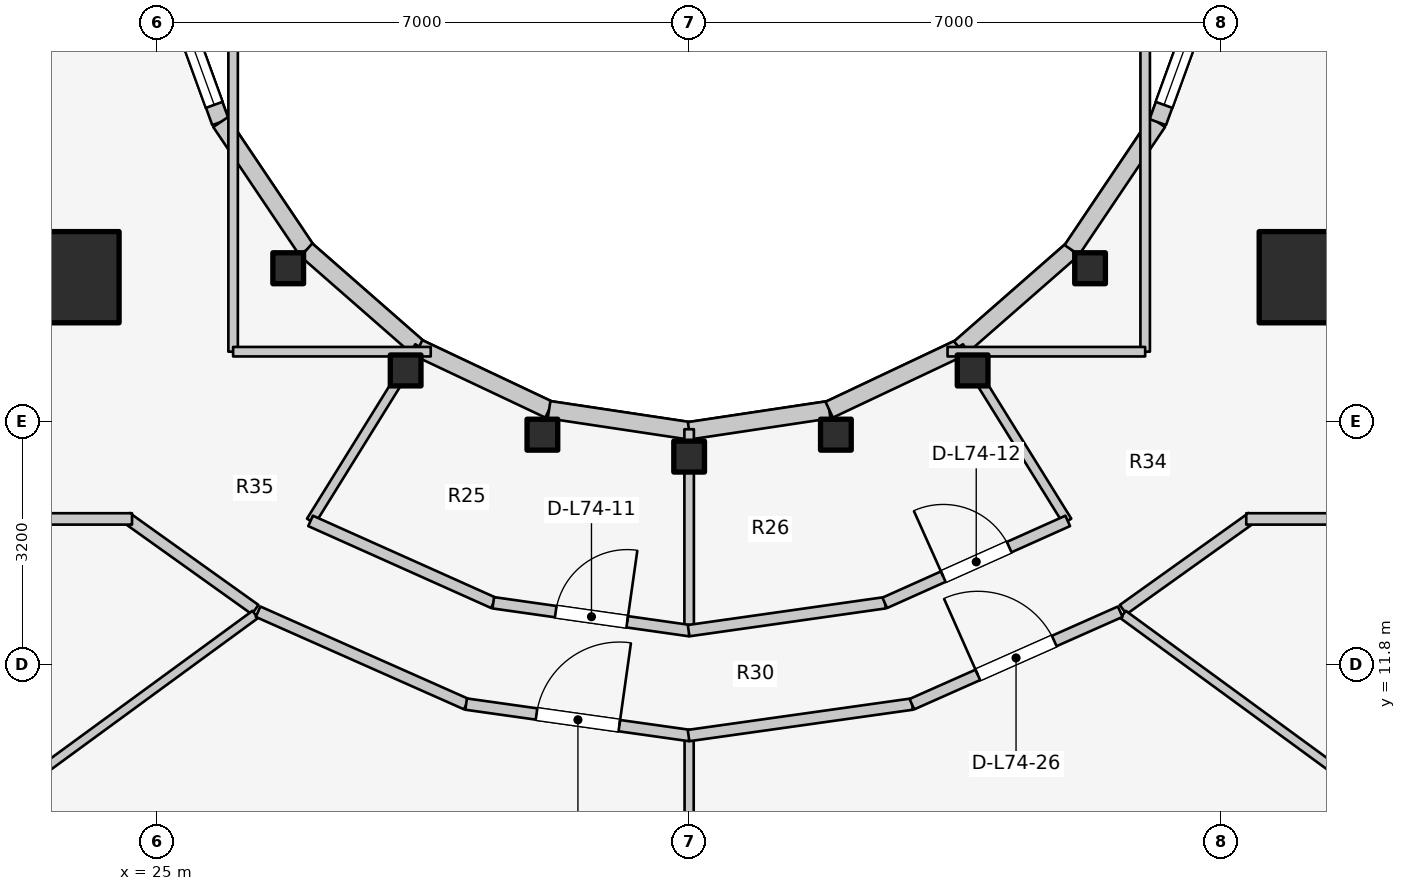
"""IFC4 building model, lengths in metres.
Left out: names, types, materials, properties, quantities, classifications, styles, units other than length and angle.
Written with IfcOpenShell. Run it as: python <this file> out.ifc"""

import sys

from ifc_helpers import new_model, si_unit, direction, frame, frame_2d, origin, origin_2d, place, context, subcontext, project, spatial, rectangle, i_section, extrude, element, fill, save


model = new_model("IFC4")
c1 = context("Model", 3, precision=1e-05, world=origin(), true_north=direction((0.0, 1.0)))
c2 = subcontext(c1, "Body", "Model", "MODEL_VIEW")
j1 = project(units=[si_unit("LENGTHUNIT", "METRE"), si_unit("PLANEANGLEUNIT", "RADIAN")], contexts=[c1])
p1 = place(None, origin())
s1 = spatial("IfcSite", under=j1, at=p1, CompositionType="ELEMENT")
p2 = place(p1, origin())
s2 = spatial("IfcBuilding", under=s1, at=p2, CompositionType="ELEMENT")
p3 = place(p2, frame((0.0, 0.0, 242.4)))
s3 = spatial("IfcBuildingStorey", under=s2, at=p3, CompositionType="ELEMENT", Elevation=242.4)
for number, where, z_axis, x_axis in (
    (1, (19.65, 16.55, 0.0), (0.0, 0.0, 1.0), (1.0, 0.0, 0.0)),
    (2, (39.85, 16.55, 0.0), (0.0, 0.0, 1.0), (1.0, 0.0, 0.0)),
):
    element("IfcWall", number, at=place(p3, frame(where, z_axis=z_axis, x_axis=x_axis)), inside=s3, PredefinedType="SHEAR", context=c2, shape_type="SweptSolid", body=[
        extrude(rectangle(XDim=4.5, YDim=0.45, at=frame_2d((2.25, 0.0))), origin(), (0.0, 0.0, 1.0), 3.6),
    ])
for number, where, z_axis, x_axis in (
    (3, (23.9, 16.9, 0.0), (0.0, 0.0, 1.0), (1.0, 0.0, 0.0)),
    (4, (40.1, 16.9, 0.0), (0.0, 0.0, 1.0), (1.0, 0.0, 0.0)),
):
    element("IfcColumn", number, at=place(p3, frame(where, z_axis=z_axis, x_axis=x_axis)), inside=s3, PredefinedType="COLUMN", context=c2, shape_type="SweptSolid", body=[
        extrude(rectangle(XDim=1.2, YDim=1.2, at=origin_2d()), origin(), (0.0, 0.0, 1.0), 3.6),
    ])
for number, where, z_axis, x_axis in (
    (5, (26.725, 17.018, 0.0), (0.0, 0.0, 1.0), (1.0, 0.0, 0.0)),
    (6, (28.27, 15.673, 0.0), (0.0, 0.0, 1.0), (1.0, 0.0, 0.0)),
    (7, (30.069, 14.828, 0.0), (0.0, 0.0, 1.0), (1.0, 0.0, 0.0)),
    (8, (32.0, 14.54, 0.0), (0.0, 0.0, 1.0), (1.0, 0.0, 0.0)),
    (9, (33.931, 14.828, 0.0), (0.0, 0.0, 1.0), (1.0, 0.0, 0.0)),
    (10, (35.73, 15.673, 0.0), (0.0, 0.0, 1.0), (1.0, 0.0, 0.0)),
    (11, (37.275, 17.018, 0.0), (0.0, 0.0, 1.0), (1.0, 0.0, 0.0)),
):
    element("IfcColumn", number, at=place(p3, frame(where, z_axis=z_axis, x_axis=x_axis)), inside=s3, PredefinedType="COLUMN", context=c2, shape_type="SweptSolid", body=[
        extrude(i_section(OverallWidth=0.404, OverallDepth=0.407, WebThickness=0.027, FlangeThickness=0.044, FilletRadius=0.025, at=origin_2d()), origin(), (0.0, 0.0, 1.0), 3.6),
    ])
p4 = place(p3, frame((25.123, 20.898, 0.0), z_axis=(0.0, 0.0, 1.0), x_axis=(0.341423187295, -0.93990968033, 0.0)))
e12 = element("IfcWall", 12, at=p4, inside=s3, PredefinedType="STANDARD", context=c2, shape_type="SweptSolid", body=[
    extrude(rectangle(XDim=2.084, YDim=0.23, at=frame_2d((1.042, 0.0))), origin(), (0.0, 0.0, 1.0), 3.28),
])
p5 = place(p4, frame((0.242, 0.0, 0.85)))
e13 = element("IfcOpeningElement", 13, at=p5, cuts=e12, PredefinedType="OPENING", context=c2, shape_type="SweptSolid", body=[
    extrude(rectangle(XDim=1.6, YDim=1.65, at=frame_2d((0.8, 0.825))), frame((0.0, 0.125, 0.0), z_axis=(0.0, -1.0, 0.0), x_axis=(1.0, 0.0, 0.0)), (0.0, 0.0, 1.0), 0.25),
])
p6 = place(p3, frame((25.834, 18.94, 0.0), z_axis=(0.0, 0.0, 1.0), x_axis=(0.558197800898, -0.829707909492, 0.0)))
e14 = element("IfcWall", 14, at=p6, inside=s3, PredefinedType="STANDARD", context=c2, shape_type="SweptSolid", body=[
    extrude(rectangle(XDim=2.027, YDim=0.23, at=frame_2d((1.013, 0.0))), origin(), (0.0, 0.0, 1.0), 2.6),
])
p7 = place(p3, frame((26.965, 17.258, 0.0), z_axis=(0.0, 0.0, 1.0), x_axis=(0.752576694707, -0.658504607869, 0.0)))
e15 = element("IfcWall", 15, at=p7, inside=s3, PredefinedType="STANDARD", context=c2, shape_type="SweptSolid", body=[
    extrude(rectangle(XDim=1.959, YDim=0.23, at=frame_2d((0.98, 0.0))), origin(), (0.0, 0.0, 1.0), 2.6),
])
p8 = place(p3, frame((28.44, 15.968, 0.0), z_axis=(0.0, 0.0, 1.0), x_axis=(0.904179699603, -0.427152280606, 0.0)))
e16 = element("IfcWall", 16, at=p8, inside=s3, PredefinedType="STANDARD", context=c2, shape_type="SweptSolid", body=[
    extrude(rectangle(XDim=1.899, YDim=0.23, at=frame_2d((0.95, 0.0))), origin(), (0.0, 0.0, 1.0), 2.6),
])
for number, where, z_axis, x_axis in (
    (17, (30.157, 15.157, 0.0), (0.0, 0.0, 1.0), (0.989, -0.149, 0.0)),
    (18, (32.0, 14.88, 0.0), (0.0, 0.0, 1.0), (0.989, 0.149, 0.0)),
):
    element("IfcWall", number, at=place(p3, frame(where, z_axis=z_axis, x_axis=x_axis)), inside=s3, PredefinedType="STANDARD", context=c2, shape_type="SweptSolid", body=[
        extrude(rectangle(XDim=1.864, YDim=0.23, at=frame_2d((0.932, 0.0))), origin(), (0.0, 0.0, 1.0), 2.6),
    ])
p9 = place(p3, frame((33.843, 15.157, 0.0), z_axis=(0.0, 0.0, 1.0), x_axis=(0.904179699603, 0.427152280606, 0.0)))
e19 = element("IfcWall", 19, at=p9, inside=s3, PredefinedType="STANDARD", context=c2, shape_type="SweptSolid", body=[
    extrude(rectangle(XDim=1.899, YDim=0.23, at=frame_2d((0.95, 0.0))), origin(), (0.0, 0.0, 1.0), 2.6),
])
p10 = place(p3, frame((35.56, 15.968, 0.0), z_axis=(0.0, 0.0, 1.0), x_axis=(0.752576694707, 0.658504607869, 0.0)))
e20 = element("IfcWall", 20, at=p10, inside=s3, PredefinedType="STANDARD", context=c2, shape_type="SweptSolid", body=[
    extrude(rectangle(XDim=1.959, YDim=0.23, at=frame_2d((0.98, 0.0))), origin(), (0.0, 0.0, 1.0), 2.6),
])
p11 = place(p3, frame((37.035, 17.258, 0.0), z_axis=(0.0, 0.0, 1.0), x_axis=(0.558197800898, 0.829707909492, 0.0)))
e21 = element("IfcWall", 21, at=p11, inside=s3, PredefinedType="STANDARD", context=c2, shape_type="SweptSolid", body=[
    extrude(rectangle(XDim=2.027, YDim=0.23, at=frame_2d((1.013, 0.0))), origin(), (0.0, 0.0, 1.0), 2.6),
])
p12 = place(p3, frame((38.166, 18.94, 0.0), z_axis=(0.0, 0.0, 1.0), x_axis=(0.341423187295, 0.93990968033, 0.0)))
e22 = element("IfcWall", 22, at=p12, inside=s3, PredefinedType="STANDARD", context=c2, shape_type="SweptSolid", body=[
    extrude(rectangle(XDim=2.084, YDim=0.23, at=frame_2d((1.042, 0.0))), origin(), (0.0, 0.0, 1.0), 3.28),
])
p13 = place(p12, frame((0.242, 0.0, 0.85)))
e23 = element("IfcOpeningElement", 23, at=p13, cuts=e22, PredefinedType="OPENING", context=c2, shape_type="SweptSolid", body=[
    extrude(rectangle(XDim=1.6, YDim=1.65, at=frame_2d((0.8, 0.825))), frame((0.0, 0.125, 0.0), z_axis=(0.0, -1.0, 0.0), x_axis=(1.0, 0.0, 0.0)), (0.0, 0.0, 1.0), 0.25),
])
p14 = place(p3, frame((28.45, 15.985, 0.0), z_axis=(0.0, 0.0, 1.0), x_axis=(-0.527527080983, -0.849538215049, 0.0)))
e24 = element("IfcWall", 24, at=p14, inside=s3, PredefinedType="PARTITIONING", context=c2, shape_type="SweptSolid", body=[
    extrude(rectangle(XDim=2.701, YDim=0.125, at=frame_2d((1.351, 0.0))), origin(), (0.0, 0.0, 1.0), 2.672),
])
p15 = place(p3, frame((32.0, 14.9, 0.0), z_axis=(0.0, 0.0, 1.0), x_axis=(0.0, -1.0, 0.0)))
e25 = element("IfcWall", 25, at=p15, inside=s3, PredefinedType="PARTITIONING", context=c2, shape_type="SweptSolid", body=[
    extrude(rectangle(XDim=2.65, YDim=0.125, at=frame_2d((1.325, 0.0))), origin(), (0.0, 0.0, 1.0), 2.672),
])
p16 = place(p3, frame((35.55, 15.985, 0.0), z_axis=(0.0, 0.0, 1.0), x_axis=(0.527527080983, -0.849538215049, 0.0)))
e26 = element("IfcWall", 26, at=p16, inside=s3, PredefinedType="PARTITIONING", context=c2, shape_type="SweptSolid", body=[
    extrude(rectangle(XDim=2.701, YDim=0.125, at=frame_2d((1.351, 0.0))), origin(), (0.0, 0.0, 1.0), 2.672),
])
p17 = place(p3, frame((27.019, 13.694, 0.0), z_axis=(0.0, 0.0, 1.0), x_axis=(0.912628408652, -0.408790151203, 0.0)))
e27 = element("IfcWall", 27, at=p17, inside=s3, PredefinedType="PARTITIONING", context=c2, shape_type="SweptSolid", body=[
    extrude(rectangle(XDim=2.638, YDim=0.15, at=frame_2d((1.319, 0.0))), origin(), (0.0, 0.0, 1.0), 2.816),
])
p18 = place(p3, frame((29.423, 12.617, 0.0), z_axis=(0.0, 0.0, 1.0), x_axis=(0.990078185178, -0.140517569133, 0.0)))
e28 = element("IfcWall", 28, at=p18, inside=s3, PredefinedType="PARTITIONING", context=c2, shape_type="SweptSolid", body=[
    extrude(rectangle(XDim=2.61, YDim=0.15, at=frame_2d((1.305, 0.0))), origin(), (0.0, 0.0, 1.0), 2.816),
])
p19 = place(p18, frame((0.83, 0.0, 0.0)))
e29 = element("IfcOpeningElement", 29, at=p19, cuts=e28, PredefinedType="OPENING", context=c2, shape_type="SweptSolid", body=[
    extrude(rectangle(XDim=0.95, YDim=2.1, at=frame_2d((0.475, 1.05))), frame((0.0, 0.085, 0.0), z_axis=(0.0, -1.0, 0.0), x_axis=(1.0, 0.0, 0.0)), (0.0, 0.0, 1.0), 0.17),
])
p20 = place(p3, frame((31.993, 12.25, 0.0), z_axis=(0.0, 0.0, 1.0), x_axis=(0.990078185178, 0.140517569133, 0.0)))
e30 = element("IfcWall", 30, at=p20, inside=s3, PredefinedType="PARTITIONING", context=c2, shape_type="SweptSolid", body=[
    extrude(rectangle(XDim=2.61, YDim=0.15, at=frame_2d((1.305, 0.0))), origin(), (0.0, 0.0, 1.0), 2.816),
])
p21 = place(p3, frame((34.573, 12.616, 0.0), z_axis=(0.0, 0.0, 1.0), x_axis=(0.912628408652, 0.408790151203, 0.0)))
e31 = element("IfcWall", 31, at=p21, inside=s3, PredefinedType="PARTITIONING", context=c2, shape_type="SweptSolid", body=[
    extrude(rectangle(XDim=2.638, YDim=0.15, at=frame_2d((1.319, 0.0))), origin(), (0.0, 0.0, 1.0), 2.816),
])
p22 = place(p21, frame((0.844, 0.0, 0.0)))
e32 = element("IfcOpeningElement", 32, at=p22, cuts=e31, PredefinedType="OPENING", context=c2, shape_type="SweptSolid", body=[
    extrude(rectangle(XDim=0.95, YDim=2.1, at=frame_2d((0.475, 1.05))), frame((0.0, 0.085, 0.0), z_axis=(0.0, -1.0, 0.0), x_axis=(1.0, 0.0, 0.0)), (0.0, 0.0, 1.0), 0.17),
])
p23 = place(p3, frame((26.0, 15.92, 0.0), z_axis=(0.0, 0.0, 1.0), x_axis=(0.0, 1.0, 0.0)))
e33 = element("IfcWall", 33, at=p23, inside=s3, PredefinedType="PARTITIONING", context=c2, shape_type="SweptSolid", body=[
    extrude(rectangle(XDim=4.28, YDim=0.125, at=frame_2d((2.14, 0.0))), origin(), (0.0, 0.0, 1.0), 2.672),
])
p24 = place(p3, frame((26.0, 15.92, 0.0), z_axis=(0.0, 0.0, 1.0), x_axis=(1.0, 0.0, 0.0)))
e34 = element("IfcWall", 34, at=p24, inside=s3, PredefinedType="PARTITIONING", context=c2, shape_type="SweptSolid", body=[
    extrude(rectangle(XDim=2.6, YDim=0.125, at=frame_2d((1.3, 0.0))), origin(), (0.0, 0.0, 1.0), 2.672),
])
p25 = place(p3, frame((38.0, 15.92, 0.0), z_axis=(0.0, 0.0, 1.0), x_axis=(0.0, 1.0, 0.0)))
e35 = element("IfcWall", 35, at=p25, inside=s3, PredefinedType="PARTITIONING", context=c2, shape_type="SweptSolid", body=[
    extrude(rectangle(XDim=4.28, YDim=0.125, at=frame_2d((2.14, 0.0))), origin(), (0.0, 0.0, 1.0), 2.672),
])
p26 = place(p3, frame((35.4, 15.92, 0.0), z_axis=(0.0, 0.0, 1.0), x_axis=(1.0, 0.0, 0.0)))
e36 = element("IfcWall", 36, at=p26, inside=s3, PredefinedType="PARTITIONING", context=c2, shape_type="SweptSolid", body=[
    extrude(rectangle(XDim=2.6, YDim=0.125, at=frame_2d((1.3, 0.0))), origin(), (0.0, 0.0, 1.0), 2.672),
])
p27 = place(p3, frame((26.29, 12.527, 0.0), z_axis=(0.0, 0.0, 1.0), x_axis=(-0.813780999276, 0.581171648669, 0.0)))
e37 = element("IfcWall", 37, at=p27, inside=s3, PredefinedType="PARTITIONING", context=c2, shape_type="SweptSolid", body=[
    extrude(rectangle(XDim=2.082, YDim=0.15, at=frame_2d((1.041, 0.0))), origin(), (0.0, 0.0, 1.0), 2.816),
])
p28 = place(p3, frame((17.15, 13.72, 0.0), z_axis=(0.0, 0.0, 1.0), x_axis=(1.0, 0.0, 0.0)))
e38 = element("IfcWall", 38, at=p28, inside=s3, PredefinedType="PARTITIONING", context=c2, shape_type="SweptSolid", body=[
    extrude(rectangle(XDim=7.52, YDim=0.15, at=frame_2d((3.76, 0.0))), origin(), (0.0, 0.0, 1.0), 2.816),
])
p29 = place(p28, frame((1.3, 0.0, 0.0)))
e39 = element("IfcOpeningElement", 39, at=p29, cuts=e38, PredefinedType="OPENING", context=c2, shape_type="SweptSolid", body=[
    extrude(rectangle(XDim=0.9, YDim=2.1, at=frame_2d((0.45, 1.05))), frame((0.0, 0.085, 0.0), z_axis=(0.0, -1.0, 0.0), x_axis=(1.0, 0.0, 0.0)), (0.0, 0.0, 1.0), 0.17),
])
p30 = place(p3, frame((37.71, 12.527, 0.0), z_axis=(0.0, 0.0, 1.0), x_axis=(0.813780999276, 0.581171648669, 0.0)))
e40 = element("IfcWall", 40, at=p30, inside=s3, PredefinedType="PARTITIONING", context=c2, shape_type="SweptSolid", body=[
    extrude(rectangle(XDim=2.082, YDim=0.15, at=frame_2d((1.041, 0.0))), origin(), (0.0, 0.0, 1.0), 2.816),
])
p31 = place(p3, frame((39.33, 13.72, 0.0), z_axis=(0.0, 0.0, 1.0), x_axis=(1.0, 0.0, 0.0)))
e41 = element("IfcWall", 41, at=p31, inside=s3, PredefinedType="PARTITIONING", context=c2, shape_type="SweptSolid", body=[
    extrude(rectangle(XDim=7.52, YDim=0.15, at=frame_2d((3.76, 0.0))), origin(), (0.0, 0.0, 1.0), 2.816),
])
p32 = place(p31, frame((5.22, 0.0, 0.0)))
e42 = element("IfcOpeningElement", 42, at=p32, cuts=e41, PredefinedType="OPENING", context=c2, shape_type="SweptSolid", body=[
    extrude(rectangle(XDim=0.9, YDim=2.1, at=frame_2d((0.45, 1.05))), frame((0.0, 0.085, 0.0), z_axis=(0.0, -1.0, 0.0), x_axis=(1.0, 0.0, 0.0)), (0.0, 0.0, 1.0), 0.17),
])
p33 = place(p3, frame((26.291, 12.463, 0.0), z_axis=(0.0, 0.0, 1.0), x_axis=(-0.807095694912, -0.590420646027, 0.0)))
e43 = element("IfcWall", 43, at=p33, inside=s3, PredefinedType="MOVABLE", context=c2, shape_type="SweptSolid", body=[
    extrude(rectangle(XDim=7.119, YDim=0.12, at=frame_2d((3.56, 0.0))), origin(), (0.0, 0.0, 1.0), 2.66),
])
p34 = place(p3, frame((32.0, 10.815, 0.0), z_axis=(0.0, 0.0, 1.0), x_axis=(0.0, -1.0, 0.0)))
e44 = element("IfcWall", 44, at=p34, inside=s3, PredefinedType="MOVABLE", context=c2, shape_type="SweptSolid", body=[
    extrude(rectangle(XDim=5.895, YDim=0.12, at=frame_2d((2.948, 0.0))), origin(), (0.0, 0.0, 1.0), 2.66),
])
p35 = place(p3, frame((37.709, 12.463, 0.0), z_axis=(0.0, 0.0, 1.0), x_axis=(0.807095694912, -0.590420646027, 0.0)))
e45 = element("IfcWall", 45, at=p35, inside=s3, PredefinedType="MOVABLE", context=c2, shape_type="SweptSolid", body=[
    extrude(rectangle(XDim=7.119, YDim=0.12, at=frame_2d((3.56, 0.0))), origin(), (0.0, 0.0, 1.0), 2.66),
])
p36 = place(p3, frame((26.328, 12.499, 0.0), z_axis=(0.0, 0.0, 1.0), x_axis=(0.914043013008, -0.4056172708, 0.0)))
e46 = element("IfcWall", 46, at=p36, inside=s3, PredefinedType="PARTITIONING", context=c2, shape_type="SweptSolid", body=[
    extrude(rectangle(XDim=2.999, YDim=0.15, at=frame_2d((1.5, 0.0))), origin(), (0.0, 0.0, 1.0), 2.816),
])
p37 = place(p3, frame((29.066, 11.284, 0.0), z_axis=(0.0, 0.0, 1.0), x_axis=(0.990252860391, -0.139281271128, 0.0)))
e47 = element("IfcWall", 47, at=p37, inside=s3, PredefinedType="PARTITIONING", context=c2, shape_type="SweptSolid", body=[
    extrude(rectangle(XDim=2.971, YDim=0.15, at=frame_2d((1.486, 0.0))), origin(), (0.0, 0.0, 1.0), 2.816),
])
p38 = place(p37, frame((0.936, 0.0, 0.0)))
e48 = element("IfcOpeningElement", 48, at=p38, cuts=e47, PredefinedType="OPENING", context=c2, shape_type="SweptSolid", body=[
    extrude(rectangle(XDim=1.1, YDim=2.1, at=frame_2d((0.55, 1.05))), frame((0.0, 0.085, 0.0), z_axis=(0.0, -1.0, 0.0), x_axis=(1.0, 0.0, 0.0)), (0.0, 0.0, 1.0), 0.17),
])
p39 = place(p3, frame((31.992, 10.87, 0.0), z_axis=(0.0, 0.0, 1.0), x_axis=(0.990252860391, 0.139281271128, 0.0)))
e49 = element("IfcWall", 49, at=p39, inside=s3, PredefinedType="PARTITIONING", context=c2, shape_type="SweptSolid", body=[
    extrude(rectangle(XDim=2.971, YDim=0.15, at=frame_2d((1.486, 0.0))), origin(), (0.0, 0.0, 1.0), 2.816),
])
p40 = place(p3, frame((34.93, 11.283, 0.0), z_axis=(0.0, 0.0, 1.0), x_axis=(0.914043013008, 0.4056172708, 0.0)))
e50 = element("IfcWall", 50, at=p40, inside=s3, PredefinedType="PARTITIONING", context=c2, shape_type="SweptSolid", body=[
    extrude(rectangle(XDim=2.999, YDim=0.15, at=frame_2d((1.5, 0.0))), origin(), (0.0, 0.0, 1.0), 2.816),
])
p41 = place(p40, frame((0.949, 0.0, 0.0)))
e51 = element("IfcOpeningElement", 51, at=p41, cuts=e50, PredefinedType="OPENING", context=c2, shape_type="SweptSolid", body=[
    extrude(rectangle(XDim=1.1, YDim=2.1, at=frame_2d((0.55, 1.05))), frame((0.0, 0.085, 0.0), z_axis=(0.0, -1.0, 0.0), x_axis=(1.0, 0.0, 0.0)), (0.0, 0.0, 1.0), 0.17),
])
p42 = place(p5, origin())
e52 = element("IfcWindow", 52, at=p42, inside=s3, PartitioningType="SINGLE_PANEL", PredefinedType="WINDOW", context=c2, shape_type="SweptSolid", body=[
    extrude(rectangle(XDim=1.6, YDim=1.65, at=frame_2d((0.8, 0.825))), frame((0.0, 0.03, 0.0), z_axis=(0.0, -1.0, 0.0), x_axis=(1.0, 0.0, 0.0)), (0.0, 0.0, 1.0), 0.06),
])
fill(e13, e52)
p43 = place(p13, origin())
e53 = element("IfcWindow", 53, at=p43, inside=s3, PartitioningType="SINGLE_PANEL", PredefinedType="WINDOW", context=c2, shape_type="SweptSolid", body=[
    extrude(rectangle(XDim=1.6, YDim=1.65, at=frame_2d((0.8, 0.825))), frame((0.0, 0.03, 0.0), z_axis=(0.0, -1.0, 0.0), x_axis=(1.0, 0.0, 0.0)), (0.0, 0.0, 1.0), 0.06),
])
fill(e23, e53)
p44 = place(p19, origin())
e54 = element("IfcDoor", 54, at=p44, inside=s3, OperationType="SINGLE_SWING_RIGHT", PredefinedType="DOOR", context=c2, shape_type="SweptSolid", body=[
    extrude(rectangle(XDim=0.95, YDim=2.1, at=frame_2d((0.475, 1.05))), frame((0.0, 0.025, 0.0), z_axis=(0.0, -1.0, 0.0), x_axis=(1.0, 0.0, 0.0)), (0.0, 0.0, 1.0), 0.05),
])
fill(e29, e54)
p45 = place(p22, origin())
e55 = element("IfcDoor", 55, at=p45, inside=s3, OperationType="SINGLE_SWING_LEFT", PredefinedType="DOOR", context=c2, shape_type="SweptSolid", body=[
    extrude(rectangle(XDim=0.95, YDim=2.1, at=frame_2d((0.475, 1.05))), frame((0.0, 0.025, 0.0), z_axis=(0.0, -1.0, 0.0), x_axis=(1.0, 0.0, 0.0)), (0.0, 0.0, 1.0), 0.05),
])
fill(e32, e55)
p46 = place(p38, origin())
e56 = element("IfcDoor", 56, at=p46, inside=s3, OperationType="SINGLE_SWING_RIGHT", PredefinedType="DOOR", context=c2, shape_type="SweptSolid", body=[
    extrude(rectangle(XDim=1.1, YDim=2.1, at=frame_2d((0.55, 1.05))), frame((0.0, 0.025, 0.0), z_axis=(0.0, -1.0, 0.0), x_axis=(1.0, 0.0, 0.0)), (0.0, 0.0, 1.0), 0.05),
])
fill(e48, e56)
p47 = place(p41, origin())
e57 = element("IfcDoor", 57, at=p47, inside=s3, OperationType="SINGLE_SWING_LEFT", PredefinedType="DOOR", context=c2, shape_type="SweptSolid", body=[
    extrude(rectangle(XDim=1.1, YDim=2.1, at=frame_2d((0.55, 1.05))), frame((0.0, 0.025, 0.0), z_axis=(0.0, -1.0, 0.0), x_axis=(1.0, 0.0, 0.0)), (0.0, 0.0, 1.0), 0.05),
])
fill(e51, e57)
save(model, sys.argv[1])
